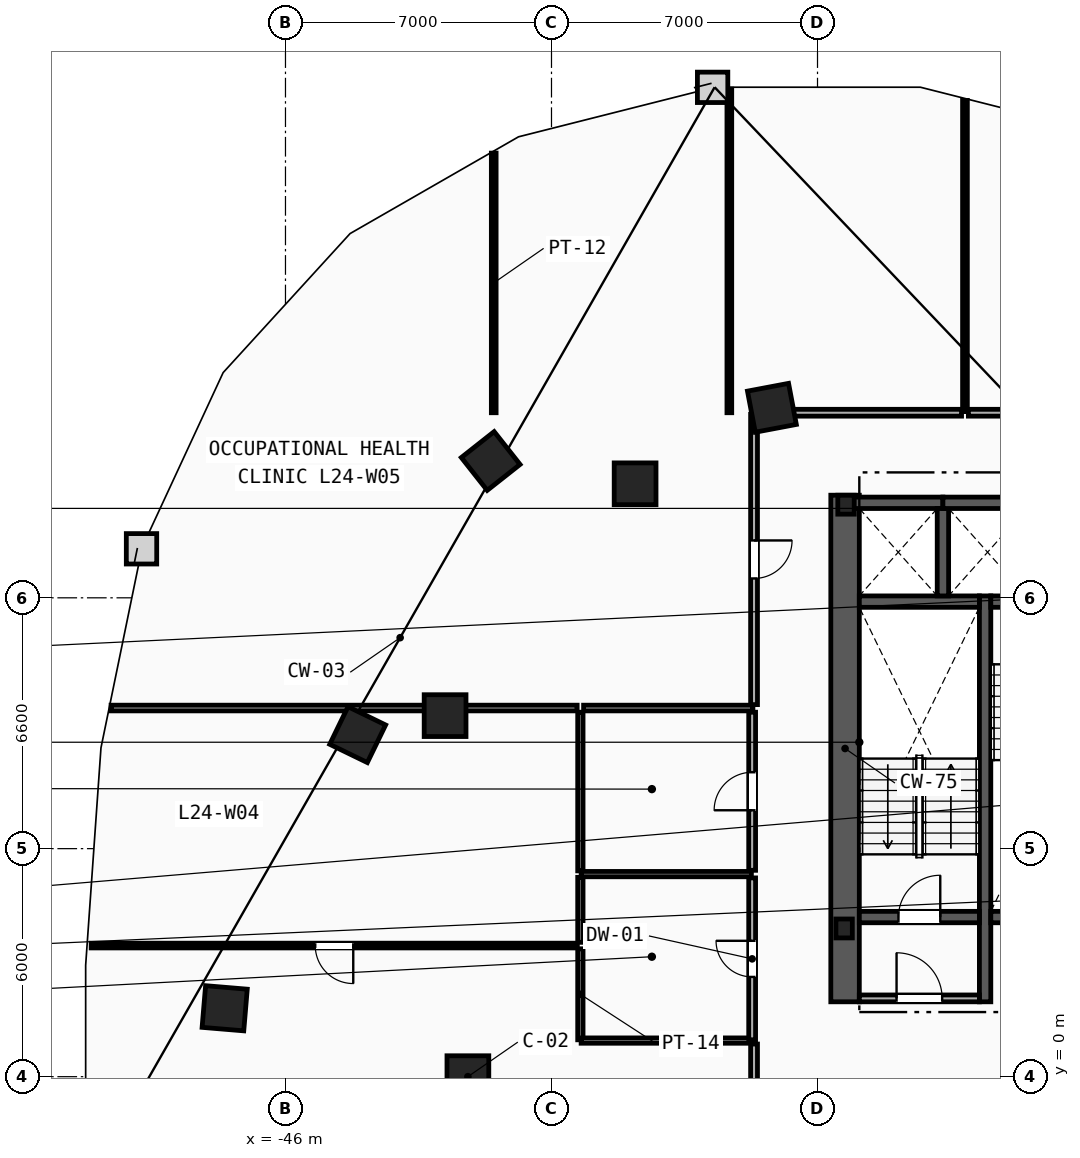
"""IFC4 building model, lengths in metres.
Left out: names, types, materials, properties, quantities, classifications, styles, units other than length and angle.
Written with IfcOpenShell. Run it as: python <this file> out.ifc"""

import sys

from ifc_helpers import new_model, si_unit, direction, frame, frame_2d, origin, origin_2d, place, context, subcontext, project, spatial, rectangle, i_section, extrude, element, fill, save


model = new_model("IFC4")
c1 = context("Model", 3, precision=1e-05, world=origin(), true_north=direction((0.0, 1.0)))
c2 = subcontext(c1, "Body", "Model", "MODEL_VIEW")
j1 = project(units=[si_unit("LENGTHUNIT", "METRE"), si_unit("PLANEANGLEUNIT", "RADIAN")], contexts=[c1])
p1 = place(None, origin())
s1 = spatial("IfcSite", under=j1, at=p1, CompositionType="ELEMENT")
p2 = place(p1, origin())
s2 = spatial("IfcBuilding", under=s1, at=p2, CompositionType="ELEMENT")
p3 = place(p2, frame((0.0, 0.0, 96.2)))
s3 = spatial("IfcBuildingStorey", under=s2, at=p3, CompositionType="ELEMENT", Elevation=96.2)
for number, where, z_axis, x_axis in (
    (1, (-31.3, 3.9, 0.0), (0.0, 0.0, 1.0), (1.0, 0.0, 0.0)),
    (2, (-31.25, 15.05, 0.0), (0.0, 0.0, 1.0), (1.0, 0.0, 0.0)),
):
    element("IfcColumn", number, at=place(p3, frame(where, z_axis=z_axis, x_axis=x_axis)), inside=s3, PredefinedType="COLUMN", context=c2, shape_type="SweptSolid", body=[
        extrude(i_section(OverallWidth=0.432, OverallDepth=0.498, WebThickness=0.056, FlangeThickness=0.089, FilletRadius=0.018, at=origin_2d()), origin(), (0.0, 0.0, 1.0), 3.6),
    ])
for number, where, z_axis, x_axis in (
    (3, (-41.2, 0.0, 0.0), (0.0, 0.0, 1.0), (1.0, 0.0, 0.0)),
    (4, (-41.8, 9.5, 0.0), (0.0, 0.0, 1.0), (1.0, 0.0, 0.0)),
    (5, (-36.8, 15.6, 0.0), (0.0, 0.0, 1.0), (1.0, 0.0, 0.0)),
    (6, (-33.2, 17.6, 0.0), (0.0, 0.0, 1.0), (-0.983, -0.186, 0.0)),
    (7, (-40.6, 16.2, 0.0), (0.0, 0.0, 1.0), (-0.785, -0.619, 0.0)),
    (8, (-44.1, 9.0, 0.0), (0.0, 0.0, 1.0), (-0.437, -0.899, 0.0)),
    (9, (-47.6, 1.8, 0.0), (0.0, 0.0, 1.0), (-0.084, -0.997, 0.0)),
):
    element("IfcColumn", number, at=place(p3, frame(where, z_axis=z_axis, x_axis=x_axis)), inside=s3, PredefinedType="COLUMN", context=c2, shape_type="SweptSolid", body=[
        extrude(rectangle(XDim=1.1, YDim=1.1, at=origin_2d()), origin(), (0.0, 0.0, 1.0), 3.6),
    ])
p4 = place(p3, frame((-31.275, 1.97, 0.0), z_axis=(0.0, 0.0, 1.0), x_axis=(0.0, 1.0, 0.0)))
e10 = element("IfcWall", 10, at=p4, inside=s3, PredefinedType="SHEAR", context=c2, shape_type="SweptSolid", body=[
    extrude(rectangle(XDim=13.33, YDim=0.75, at=frame_2d((6.665, 0.0))), origin(), (0.0, 0.0, 1.0), 3.3),
])
p5 = place(p3, frame((-27.59, 1.97, 0.0), z_axis=(0.0, 0.0, 1.0), x_axis=(0.0, 1.0, 0.0)))
e11 = element("IfcWall", 11, at=p5, inside=s3, PredefinedType="SHEAR", context=c2, shape_type="SweptSolid", body=[
    extrude(rectangle(XDim=10.68, YDim=0.3, at=frame_2d((5.34, 0.0))), origin(), (0.0, 0.0, 1.0), 3.3),
])
p6 = place(p3, frame((-30.9, 4.2, 0.0), z_axis=(0.0, 0.0, 1.0), x_axis=(1.0, 0.0, 0.0)))
e12 = element("IfcWall", 12, at=p6, inside=s3, PredefinedType="SHEAR", context=c2, shape_type="SweptSolid", body=[
    extrude(rectangle(XDim=3.16, YDim=0.3, at=frame_2d((1.58, 0.0))), origin(), (0.0, 0.0, 1.0), 3.3),
])
p7 = place(p6, frame((1.03, 0.0, 0.0)))
e13 = element("IfcOpeningElement", 13, at=p7, cuts=e12, PredefinedType="OPENING", context=c2, shape_type="SweptSolid", body=[
    extrude(rectangle(XDim=1.1, YDim=2.15, at=frame_2d((0.55, 1.075))), frame((0.0, 0.16, 0.0), z_axis=(0.0, -1.0, 0.0), x_axis=(1.0, 0.0, 0.0)), (0.0, 0.0, 1.0), 0.32),
])
p8 = place(p3, frame((-30.9, 12.5, 0.0), z_axis=(0.0, 0.0, 1.0), x_axis=(1.0, 0.0, 0.0)))
e14 = element("IfcWall", 14, at=p8, inside=s3, PredefinedType="SHEAR", context=c2, shape_type="SweptSolid", body=[
    extrude(rectangle(XDim=3.16, YDim=0.3, at=frame_2d((1.58, 0.0))), origin(), (0.0, 0.0, 1.0), 3.3),
])
p9 = place(p3, frame((-27.44, 12.5, 0.0), z_axis=(0.0, 0.0, 1.0), x_axis=(1.0, 0.0, 0.0)))
e15 = element("IfcWall", 15, at=p9, inside=s3, PredefinedType="SHEAR", context=c2, shape_type="SweptSolid", body=[
    extrude(rectangle(XDim=3.16, YDim=0.3, at=frame_2d((1.58, 0.0))), origin(), (0.0, 0.0, 1.0), 3.3),
])
p10 = place(p9, frame((1.03, 0.0, 0.0)))
e16 = element("IfcOpeningElement", 16, at=p10, cuts=e15, PredefinedType="OPENING", context=c2, shape_type="SweptSolid", body=[
    extrude(rectangle(XDim=1.1, YDim=2.15, at=frame_2d((0.55, 1.075))), frame((0.0, 0.16, 0.0), z_axis=(0.0, -1.0, 0.0), x_axis=(1.0, 0.0, 0.0)), (0.0, 0.0, 1.0), 0.32),
])
p11 = place(p3, frame((-27.44, 4.2, 0.0), z_axis=(0.0, 0.0, 1.0), x_axis=(1.0, 0.0, 0.0)))
e17 = element("IfcWall", 17, at=p11, inside=s3, PredefinedType="SHEAR", context=c2, shape_type="SweptSolid", body=[
    extrude(rectangle(XDim=3.16, YDim=0.3, at=frame_2d((1.58, 0.0))), origin(), (0.0, 0.0, 1.0), 3.3),
])
p12 = place(p3, frame((-30.9, 2.06, 0.0), z_axis=(0.0, 0.0, 1.0), x_axis=(1.0, 0.0, 0.0)))
e18 = element("IfcWall", 18, at=p12, inside=s3, PredefinedType="PARTITIONING", context=c2, shape_type="SweptSolid", body=[
    extrude(rectangle(XDim=3.16, YDim=0.18, at=frame_2d((1.58, 0.0))), origin(), (0.0, 0.0, 1.0), 3.3),
])
p13 = place(p12, frame((0.98, 0.0, 0.0)))
e19 = element("IfcOpeningElement", 19, at=p13, cuts=e18, PredefinedType="OPENING", context=c2, shape_type="SweptSolid", body=[
    extrude(rectangle(XDim=1.2, YDim=2.15, at=frame_2d((0.6, 1.075))), frame((0.0, 0.1, 0.0), z_axis=(0.0, -1.0, 0.0), x_axis=(1.0, 0.0, 0.0)), (0.0, 0.0, 1.0), 0.2),
])
p14 = place(p3, frame((-31.2, 15.1, 0.0), z_axis=(0.0, 0.0, 1.0), x_axis=(1.0, 0.0, 0.0)))
e20 = element("IfcWall", 20, at=p14, inside=s3, PredefinedType="SHEAR", context=c2, shape_type="SweptSolid", body=[
    extrude(rectangle(XDim=2.5, YDim=0.3, at=frame_2d((1.25, 0.0))), origin(), (0.0, 0.0, 1.0), 3.3),
])
p15 = place(p3, frame((-28.7, 12.65, 0.0), z_axis=(0.0, 0.0, 1.0), x_axis=(0.0, 1.0, 0.0)))
e21 = element("IfcWall", 21, at=p15, inside=s3, PredefinedType="SHEAR", context=c2, shape_type="SweptSolid", body=[
    extrude(rectangle(XDim=2.3, YDim=0.3, at=frame_2d((1.15, 0.0))), origin(), (0.0, 0.0, 1.0), 3.3),
])
p16 = place(p3, frame((-28.7, 15.1, 0.0), z_axis=(0.0, 0.0, 1.0), x_axis=(1.0, 0.0, 0.0)))
e22 = element("IfcWall", 22, at=p16, inside=s3, PredefinedType="SHEAR", context=c2, shape_type="SweptSolid", body=[
    extrude(rectangle(XDim=2.5, YDim=0.3, at=frame_2d((1.25, 0.0))), origin(), (0.0, 0.0, 1.0), 3.3),
])
p17 = place(p3, frame((-38.24, 0.97, 0.0), z_axis=(0.0, 0.0, 1.0), x_axis=(0.0, 1.0, 0.0)))
e23 = element("IfcWall", 23, at=p17, inside=s3, PredefinedType="PARTITIONING", context=c2, shape_type="SweptSolid", body=[
    extrude(rectangle(XDim=2.395, YDim=0.14, at=frame_2d((1.198, 0.0))), origin(), (0.0, 0.0, 1.0), 3.3),
])
p18 = place(p3, frame((-38.24, 3.535, 0.0), z_axis=(0.0, 0.0, 1.0), x_axis=(0.0, 1.0, 0.0)))
e24 = element("IfcWall", 24, at=p18, inside=s3, PredefinedType="PARTITIONING", context=c2, shape_type="SweptSolid", body=[
    extrude(rectangle(XDim=1.71, YDim=0.14, at=frame_2d((0.855, 0.0))), origin(), (0.0, 0.0, 1.0), 3.3),
])
p19 = place(p3, frame((-38.24, 5.415, 0.0), z_axis=(0.0, 0.0, 1.0), x_axis=(0.0, 1.0, 0.0)))
e25 = element("IfcWall", 25, at=p19, inside=s3, PredefinedType="PARTITIONING", context=c2, shape_type="SweptSolid", body=[
    extrude(rectangle(XDim=4.175, YDim=0.14, at=frame_2d((2.087, 0.0))), origin(), (0.0, 0.0, 1.0), 3.3),
])
for number, where, z_axis, x_axis in (
    (26, (-38.22, 0.95, 0.0), (0.0, 0.0, 1.0), (1.0, 0.0, 0.0)),
    (27, (-38.22, 5.33, 0.0), (0.0, 0.0, 1.0), (1.0, 0.0, 0.0)),
):
    element("IfcWall", number, at=place(p3, frame(where, z_axis=z_axis, x_axis=x_axis)), inside=s3, PredefinedType="PARTITIONING", context=c2, shape_type="SweptSolid", body=[
        extrude(rectangle(XDim=4.48, YDim=0.14, at=frame_2d((2.24, 0.0))), origin(), (0.0, 0.0, 1.0), 3.3),
    ])
p20 = place(p3, frame((-33.72, 0.97, 0.0), z_axis=(0.0, 0.0, 1.0), x_axis=(0.0, 1.0, 0.0)))
e28 = element("IfcWall", 28, at=p20, inside=s3, PredefinedType="PARTITIONING", context=c2, shape_type="SweptSolid", body=[
    extrude(rectangle(XDim=4.26, YDim=0.18, at=frame_2d((2.13, 0.0))), origin(), (0.0, 0.0, 1.0), 3.3),
])
p21 = place(p20, frame((1.655, 0.0, 0.0)))
e29 = element("IfcOpeningElement", 29, at=p21, cuts=e28, PredefinedType="OPENING", context=c2, shape_type="SweptSolid", body=[
    extrude(rectangle(XDim=0.95, YDim=2.1, at=frame_2d((0.475, 1.05))), frame((0.0, 0.1, 0.0), z_axis=(0.0, -1.0, 0.0), x_axis=(1.0, 0.0, 0.0)), (0.0, 0.0, 1.0), 0.2),
])
p22 = place(p3, frame((-33.72, 5.43, 0.0), z_axis=(0.0, 0.0, 1.0), x_axis=(0.0, 1.0, 0.0)))
e30 = element("IfcWall", 30, at=p22, inside=s3, PredefinedType="PARTITIONING", context=c2, shape_type="SweptSolid", body=[
    extrude(rectangle(XDim=4.16, YDim=0.18, at=frame_2d((2.08, 0.0))), origin(), (0.0, 0.0, 1.0), 3.3),
])
p23 = place(p22, frame((1.58, 0.0, 0.0)))
e31 = element("IfcOpeningElement", 31, at=p23, cuts=e30, PredefinedType="OPENING", context=c2, shape_type="SweptSolid", body=[
    extrude(rectangle(XDim=1.0, YDim=2.15, at=frame_2d((0.5, 1.075))), frame((0.0, 0.1, 0.0), z_axis=(0.0, -1.0, 0.0), x_axis=(1.0, 0.0, 0.0)), (0.0, 0.0, 1.0), 0.2),
])
p24 = place(p3, frame((-50.589, 9.7, 0.0), z_axis=(0.0, 0.0, 1.0), x_axis=(1.0, 0.0, 0.0)))
e32 = element("IfcWall", 32, at=p24, inside=s3, PredefinedType="PARTITIONING", context=c2, shape_type="SweptSolid", body=[
    extrude(rectangle(XDim=12.264, YDim=0.15, at=frame_2d((6.132, 0.0))), origin(), (0.0, 0.0, 1.0), 3.3),
])
p25 = place(p3, frame((-38.155, 9.7, 0.0), z_axis=(0.0, 0.0, 1.0), x_axis=(1.0, 0.0, 0.0)))
e33 = element("IfcWall", 33, at=p25, inside=s3, PredefinedType="PARTITIONING", context=c2, shape_type="SweptSolid", body=[
    extrude(rectangle(XDim=4.455, YDim=0.15, at=frame_2d((2.228, 0.0))), origin(), (0.0, 0.0, 1.0), 3.3),
])
p26 = place(p3, frame((-40.52, 17.47, 0.0), z_axis=(0.0, 0.0, 1.0), x_axis=(0.0, 1.0, 0.0)))
e34 = element("IfcWall", 34, at=p26, inside=s3, PredefinedType="PARTITIONING", context=c2, shape_type="SweptSolid", body=[
    extrude(rectangle(XDim=6.831, YDim=0.125, at=frame_2d((3.416, 0.0))), origin(), (0.0, 0.0, 1.0), 3.3),
])
p27 = place(p3, frame((-34.32, 17.47, 0.0), z_axis=(0.0, 0.0, 1.0), x_axis=(0.0, 1.0, 0.0)))
e35 = element("IfcWall", 35, at=p27, inside=s3, PredefinedType="PARTITIONING", context=c2, shape_type="SweptSolid", body=[
    extrude(rectangle(XDim=8.515, YDim=0.125, at=frame_2d((4.258, 0.0))), origin(), (0.0, 0.0, 1.0), 3.3),
])
p28 = place(p3, frame((-28.12, 17.5, 0.0), z_axis=(0.0, 0.0, 1.0), x_axis=(0.0, 1.0, 0.0)))
e36 = element("IfcWall", 36, at=p28, inside=s3, PredefinedType="PARTITIONING", context=c2, shape_type="SweptSolid", body=[
    extrude(rectangle(XDim=8.188, YDim=0.125, at=frame_2d((4.094, 0.0))), origin(), (0.0, 0.0, 1.0), 3.3),
])
p29 = place(p3, frame((-33.67, 0.859, 0.0), z_axis=(0.0, 0.0, 1.0), x_axis=(0.0, -1.0, 0.0)))
e37 = element("IfcWall", 37, at=p29, inside=s3, PredefinedType="PARTITIONING", context=c2, shape_type="SweptSolid", body=[
    extrude(rectangle(XDim=10.389, YDim=0.18, at=frame_2d((5.194, 0.0))), origin(), (0.0, 0.0, 1.0), 3.3),
])
p30 = place(p29, frame((4.694, 0.0, 0.0)))
e38 = element("IfcOpeningElement", 38, at=p30, cuts=e37, PredefinedType="OPENING", context=c2, shape_type="SweptSolid", body=[
    extrude(rectangle(XDim=1.0, YDim=2.15, at=frame_2d((0.5, 1.075))), frame((0.0, 0.1, 0.0), z_axis=(0.0, -1.0, 0.0), x_axis=(1.0, 0.0, 0.0)), (0.0, 0.0, 1.0), 0.2),
])
p31 = place(p3, frame((-16.822, 17.47, 0.0), z_axis=(0.0, 0.0, 1.0), x_axis=(-1.0, 0.0, 0.0)))
e39 = element("IfcWall", 39, at=p31, inside=s3, PredefinedType="PARTITIONING", context=c2, shape_type="SweptSolid", body=[
    extrude(rectangle(XDim=11.208, YDim=0.18, at=frame_2d((5.604, 0.0))), origin(), (0.0, 0.0, 1.0), 3.3),
])
p32 = place(p3, frame((-33.67, 17.428, 0.0), z_axis=(0.0, 0.0, 1.0), x_axis=(0.0, -1.0, 0.0)))
e40 = element("IfcWall", 40, at=p32, inside=s3, PredefinedType="PARTITIONING", context=c2, shape_type="SweptSolid", body=[
    extrude(rectangle(XDim=7.638, YDim=0.18, at=frame_2d((3.819, 0.0))), origin(), (0.0, 0.0, 1.0), 3.3),
])
p33 = place(p32, frame((3.319, 0.0, 0.0)))
e41 = element("IfcOpeningElement", 41, at=p33, cuts=e40, PredefinedType="OPENING", context=c2, shape_type="SweptSolid", body=[
    extrude(rectangle(XDim=1.0, YDim=2.15, at=frame_2d((0.5, 1.075))), frame((0.0, 0.1, 0.0), z_axis=(0.0, -1.0, 0.0), x_axis=(1.0, 0.0, 0.0)), (0.0, 0.0, 1.0), 0.2),
])
p34 = place(p3, frame((-28.21, 17.47, 0.0), z_axis=(0.0, 0.0, 1.0), x_axis=(-1.0, 0.0, 0.0)))
e42 = element("IfcWall", 42, at=p34, inside=s3, PredefinedType="PARTITIONING", context=c2, shape_type="SweptSolid", body=[
    extrude(rectangle(XDim=5.418, YDim=0.18, at=frame_2d((2.709, 0.0))), origin(), (0.0, 0.0, 1.0), 3.3),
])
p35 = place(p3, frame((-38.32, 3.45, 0.0), z_axis=(0.0, 0.0, 1.0), x_axis=(-1.0, 0.0, 0.0)))
e43 = element("IfcWall", 43, at=p35, inside=s3, PredefinedType="PARTITIONING", context=c2, shape_type="SweptSolid", body=[
    extrude(rectangle(XDim=12.793, YDim=0.125, at=frame_2d((6.396, 0.0))), origin(), (0.0, 0.0, 1.0), 3.3),
])
p36 = place(p35, frame((5.896, 0.0, 0.0)))
e44 = element("IfcOpeningElement", 44, at=p36, cuts=e43, PredefinedType="OPENING", context=c2, shape_type="SweptSolid", body=[
    extrude(rectangle(XDim=1.0, YDim=2.15, at=frame_2d((0.5, 1.075))), frame((0.0, 0.073, 0.0), z_axis=(0.0, -1.0, 0.0), x_axis=(1.0, 0.0, 0.0)), (0.0, 0.0, 1.0), 0.145),
])
p37 = place(p7, origin())
e45 = element("IfcDoor", 45, at=p37, inside=s3, OperationType="SINGLE_SWING_RIGHT", PredefinedType="DOOR", context=c2, shape_type="SweptSolid", body=[
    extrude(rectangle(XDim=1.1, YDim=2.15, at=frame_2d((0.55, 1.075))), frame((0.0, 0.025, 0.0), z_axis=(0.0, -1.0, 0.0), x_axis=(1.0, 0.0, 0.0)), (0.0, 0.0, 1.0), 0.05),
])
fill(e13, e45)
p38 = place(p13, origin())
e46 = element("IfcDoor", 46, at=p38, inside=s3, OperationType="SINGLE_SWING_LEFT", PredefinedType="DOOR", context=c2, shape_type="SweptSolid", body=[
    extrude(rectangle(XDim=1.2, YDim=2.15, at=frame_2d((0.6, 1.075))), frame((0.0, 0.025, 0.0), z_axis=(0.0, -1.0, 0.0), x_axis=(1.0, 0.0, 0.0)), (0.0, 0.0, 1.0), 0.05),
])
fill(e19, e46)
p39 = place(p36, origin())
e47 = element("IfcDoor", 47, at=p39, inside=s3, OperationType="SINGLE_SWING_LEFT", PredefinedType="DOOR", context=c2, shape_type="SweptSolid", body=[
    extrude(rectangle(XDim=1.0, YDim=2.15, at=frame_2d((0.5, 1.075))), frame((0.0, 0.025, 0.0), z_axis=(0.0, -1.0, 0.0), x_axis=(1.0, 0.0, 0.0)), (0.0, 0.0, 1.0), 0.05),
])
fill(e44, e47)
p40 = place(p33, origin())
e48 = element("IfcDoor", 48, at=p40, inside=s3, OperationType="SINGLE_SWING_LEFT", PredefinedType="DOOR", context=c2, shape_type="SweptSolid", body=[
    extrude(rectangle(XDim=1.0, YDim=2.15, at=frame_2d((0.5, 1.075))), frame((0.0, 0.025, 0.0), z_axis=(0.0, -1.0, 0.0), x_axis=(1.0, 0.0, 0.0)), (0.0, 0.0, 1.0), 0.05),
])
fill(e41, e48)
p41 = place(p21, origin())
e49 = element("IfcDoor", 49, at=p41, inside=s3, OperationType="SINGLE_SWING_RIGHT", PredefinedType="DOOR", context=c2, shape_type="SweptSolid", body=[
    extrude(rectangle(XDim=0.95, YDim=2.1, at=frame_2d((0.475, 1.05))), frame((0.0, 0.025, 0.0), z_axis=(0.0, -1.0, 0.0), x_axis=(1.0, 0.0, 0.0)), (0.0, 0.0, 1.0), 0.05),
])
fill(e29, e49)
p42 = place(p23, origin())
e50 = element("IfcDoor", 50, at=p42, inside=s3, OperationType="SINGLE_SWING_LEFT", PredefinedType="DOOR", context=c2, shape_type="SweptSolid", body=[
    extrude(rectangle(XDim=1.0, YDim=2.15, at=frame_2d((0.5, 1.075))), frame((0.0, 0.025, 0.0), z_axis=(0.0, -1.0, 0.0), x_axis=(1.0, 0.0, 0.0)), (0.0, 0.0, 1.0), 0.05),
])
fill(e31, e50)
save(model, sys.argv[1])
